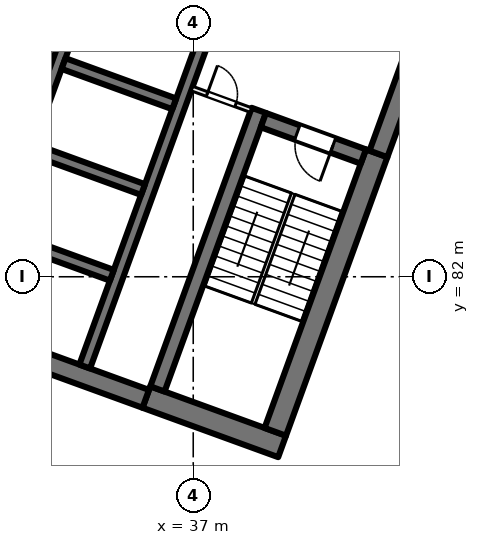
"""IFC4 building model, lengths in metres.
Left out: names, types, materials, properties, quantities, classifications, styles, units other than length and angle.
Written with IfcOpenShell. Run it as: python <this file> out.ifc"""

import sys

from ifc_helpers import new_model, si_unit, direction, frame, frame_2d, origin, place, context, subcontext, project, spatial, rectangle, extrude, element, fill, save


model = new_model("IFC4")
c1 = context("Model", 3, precision=1e-05, world=origin(), true_north=direction((0.0, 1.0)))
c2 = subcontext(c1, "Body", "Model", "MODEL_VIEW")
j1 = project(units=[si_unit("LENGTHUNIT", "METRE"), si_unit("PLANEANGLEUNIT", "RADIAN")], contexts=[c1])
p1 = place(None, origin())
s1 = spatial("IfcSite", under=j1, at=p1, CompositionType="ELEMENT")
p2 = place(p1, origin())
s2 = spatial("IfcBuilding", under=s1, at=p2, CompositionType="ELEMENT")
p3 = place(p2, frame((0.0, 0.0, 196.0)))
s3 = spatial("IfcBuildingStorey", under=s2, at=p3, CompositionType="ELEMENT", Elevation=196.0)
p4 = place(p3, frame((39.338, 77.535, 0.0), z_axis=(0.0, 0.0, 1.0), x_axis=(-0.939701471648, 0.341995824804, 0.0)))
e1 = element("IfcWall", 1, at=p4, inside=s3, PredefinedType="SHEAR", context=c2, shape_type="SweptSolid", body=[
    extrude(rectangle(XDim=3.8, YDim=0.6, at=frame_2d((1.9, 0.0))), origin(), (0.0, 0.0, 1.0), 4.0),
])
p5 = place(p3, frame((35.75, 78.788, 0.0), z_axis=(0.0, 0.0, 1.0), x_axis=(-0.939692894512, 0.342019391267, 0.0)))
e2 = element("IfcWall", 2, at=p5, inside=s3, PredefinedType="SHEAR", context=c2, shape_type="SweptSolid", body=[
    extrude(rectangle(XDim=14.4, YDim=0.5, at=frame_2d((7.2, 0.0))), origin(), (0.0, 0.0, 1.0), 4.0),
])
p6 = place(p3, frame((39.159, 77.92, 0.0), z_axis=(0.0, 0.0, 1.0), x_axis=(0.342016982193, 0.939693771338, 0.0)))
e3 = element("IfcWall", 3, at=p6, inside=s3, PredefinedType="SHEAR", context=c2, shape_type="SweptSolid", body=[
    extrude(rectangle(XDim=7.8, YDim=0.6, at=frame_2d((3.9, 0.0))), origin(), (0.0, 0.0, 1.0), 4.0),
])
p7 = place(p3, frame((41.874, 85.232, 0.0), z_axis=(0.0, 0.0, 1.0), x_axis=(0.342020437038, 0.939692513883, 0.0)))
e4 = element("IfcWall", 4, at=p7, inside=s3, PredefinedType="SHEAR", context=c2, shape_type="SweptSolid", body=[
    extrude(rectangle(XDim=8.975, YDim=0.5, at=frame_2d((4.487, 0.0))), origin(), (0.0, 0.0, 1.0), 4.0),
])
p8 = place(p3, frame((36.058, 79.048, 0.0), z_axis=(0.0, 0.0, 1.0), x_axis=(0.342016982193, 0.939693771338, 0.0)))
e5 = element("IfcWall", 5, at=p8, inside=s3, PredefinedType="SHEAR", context=c2, shape_type="SweptSolid", body=[
    extrude(rectangle(XDim=7.8, YDim=0.4, at=frame_2d((3.9, 0.0))), origin(), (0.0, 0.0, 1.0), 4.0),
])
p9 = place(p3, frame((41.476, 85.164, 0.0), z_axis=(0.0, 0.0, 1.0), x_axis=(-0.939678810556, 0.342058084236, 0.0)))
e6 = element("IfcWall", 6, at=p9, inside=s3, PredefinedType="SHEAR", context=c2, shape_type="SweptSolid", body=[
    extrude(rectangle(XDim=2.8, YDim=0.4, at=frame_2d((1.4, 0.0))), origin(), (0.0, 0.0, 1.0), 4.0),
])
p10 = place(p9, frame((0.85, 0.0, 0.0)))
e7 = element("IfcOpeningElement", 7, at=p10, cuts=e6, PredefinedType="OPENING", context=c2, shape_type="SweptSolid", body=[
    extrude(rectangle(XDim=1.0, YDim=2.1, at=frame_2d((0.5, 1.05))), frame((0.0, 0.21, 0.0), z_axis=(0.0, -1.0, 0.0), x_axis=(1.0, 0.0, 0.0)), (0.0, 0.0, 1.0), 0.42),
])
p11 = place(p3, frame((30.949, 80.801, 0.0), z_axis=(0.0, 0.0, 1.0), x_axis=(0.342016684409, 0.939693879721, 0.0)))
e8 = element("IfcWall", 8, at=p11, inside=s3, PredefinedType="SHEAR", context=c2, shape_type="SweptSolid", body=[
    extrude(rectangle(XDim=12.25, YDim=0.3, at=frame_2d((6.125, 0.0))), origin(), (0.0, 0.0, 1.0), 4.0),
])
p12 = place(p11, frame((0.9, 0.0, 0.0)))
e9 = element("IfcOpeningElement", 9, at=p12, cuts=e8, PredefinedType="OPENING", context=c2, shape_type="SweptSolid", body=[
    extrude(rectangle(XDim=0.8, YDim=2.1, at=frame_2d((0.4, 1.05))), frame((0.0, 0.16, 0.0), z_axis=(0.0, -1.0, 0.0), x_axis=(1.0, 0.0, 0.0)), (0.0, 0.0, 1.0), 0.32),
])
p13 = place(p11, frame((5.7, 0.0, 0.0)))
e10 = element("IfcOpeningElement", 10, at=p13, cuts=e8, PredefinedType="OPENING", context=c2, shape_type="SweptSolid", body=[
    extrude(rectangle(XDim=0.8, YDim=2.1, at=frame_2d((0.4, 1.05))), frame((0.0, 0.16, 0.0), z_axis=(0.0, -1.0, 0.0), x_axis=(1.0, 0.0, 0.0)), (0.0, 0.0, 1.0), 0.32),
])
p14 = place(p3, frame((34.144, 79.638, 0.0), z_axis=(0.0, 0.0, 1.0), x_axis=(0.342016684409, 0.939693879721, 0.0)))
e11 = element("IfcWall", 11, at=p14, inside=s3, PredefinedType="SHEAR", context=c2, shape_type="SweptSolid", body=[
    extrude(rectangle(XDim=12.25, YDim=0.3, at=frame_2d((6.125, 0.0))), origin(), (0.0, 0.0, 1.0), 4.0),
])
p15 = place(p3, frame((34.858, 82.039, 0.0), z_axis=(0.0, 0.0, 1.0), x_axis=(-0.939689908313, 0.342027595692, 0.0)))
e12 = element("IfcWall", 12, at=p15, inside=s3, PredefinedType="SHEAR", context=c2, shape_type="SweptSolid", body=[
    extrude(rectangle(XDim=3.1, YDim=0.3, at=frame_2d((1.55, 0.0))), origin(), (0.0, 0.0, 1.0), 4.0),
])
p16 = place(p3, frame((35.679, 84.294, 0.0), z_axis=(0.0, 0.0, 1.0), x_axis=(-0.939706007505, 0.341983361377, 0.0)))
e13 = element("IfcWall", 13, at=p16, inside=s3, PredefinedType="SHEAR", context=c2, shape_type="SweptSolid", body=[
    extrude(rectangle(XDim=3.1, YDim=0.3, at=frame_2d((1.55, 0.0))), origin(), (0.0, 0.0, 1.0), 4.0),
])
p17 = place(p3, frame((36.5, 86.549, 0.0), z_axis=(0.0, 0.0, 1.0), x_axis=(-0.939689908313, 0.342027595692, 0.0)))
e14 = element("IfcWall", 14, at=p17, inside=s3, PredefinedType="SHEAR", context=c2, shape_type="SweptSolid", body=[
    extrude(rectangle(XDim=3.1, YDim=0.3, at=frame_2d((1.55, 0.0))), origin(), (0.0, 0.0, 1.0), 4.0),
])
p18 = place(p3, frame((36.966, 86.952, 0.0), z_axis=(0.0, 0.0, 1.0), x_axis=(0.939672407396, -0.342075674051, 0.0)))
e15 = element("IfcWall", 15, at=p18, inside=s3, PredefinedType="PARTITIONING", context=c2, shape_type="SweptSolid", body=[
    extrude(rectangle(XDim=1.65, YDim=0.125, at=frame_2d((0.825, 0.0))), origin(), (0.0, 0.0, 1.0), 3.625),
])
p19 = place(p18, frame((0.425, 0.0, 0.0)))
e16 = element("IfcOpeningElement", 16, at=p19, cuts=e15, PredefinedType="OPENING", context=c2, shape_type="SweptSolid", body=[
    extrude(rectangle(XDim=0.8, YDim=2.1, at=frame_2d((0.4, 1.05))), frame((0.0, 0.073, 0.0), z_axis=(0.0, -1.0, 0.0), x_axis=(1.0, 0.0, 0.0)), (0.0, 0.0, 1.0), 0.145),
])
p20 = place(p10, origin())
e17 = element("IfcDoor", 17, at=p20, inside=s3, OperationType="SINGLE_SWING_RIGHT", PredefinedType="DOOR", context=c2, shape_type="SweptSolid", body=[
    extrude(rectangle(XDim=1.0, YDim=2.1, at=frame_2d((0.5, 1.05))), frame((0.0, 0.025, 0.0), z_axis=(0.0, -1.0, 0.0), x_axis=(1.0, 0.0, 0.0)), (0.0, 0.0, 1.0), 0.05),
])
fill(e7, e17)
p21 = place(p19, origin())
e18 = element("IfcDoor", 18, at=p21, inside=s3, OperationType="SINGLE_SWING_LEFT", PredefinedType="DOOR", context=c2, shape_type="SweptSolid", body=[
    extrude(rectangle(XDim=0.8, YDim=2.1, at=frame_2d((0.4, 1.05))), frame((0.0, 0.025, 0.0), z_axis=(0.0, -1.0, 0.0), x_axis=(1.0, 0.0, 0.0)), (0.0, 0.0, 1.0), 0.05),
])
fill(e16, e18)
save(model, sys.argv[1])
